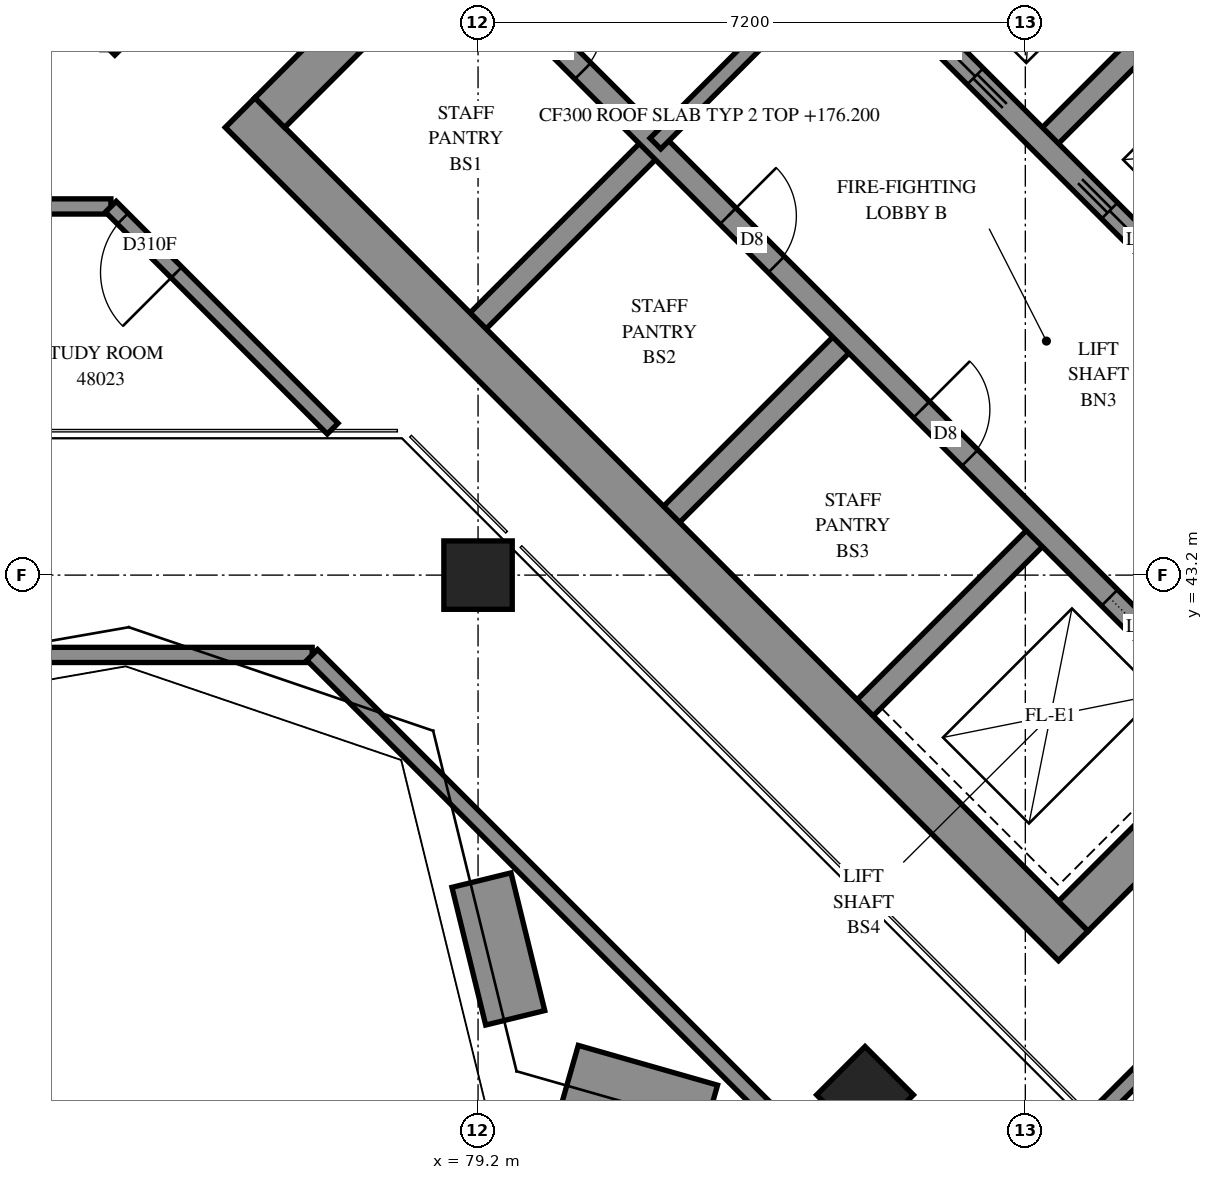
"""IFC4 building model, lengths in metres.
Left out: names, types, materials, properties, quantities, classifications, styles, units other than length and angle.
Written with IfcOpenShell. Run it as: python <this file> out.ifc"""

import sys

from ifc_helpers import new_model, si_unit, direction, frame, frame_2d, origin, origin_2d, place, context, subcontext, project, spatial, polyline, rectangle, outline, extrude, element, fill, save


model = new_model("IFC4")
c1 = context("Model", 3, precision=1e-05, world=origin(), true_north=direction((0.0, 1.0)))
c2 = subcontext(c1, "Body", "Model", "MODEL_VIEW")
j1 = project(units=[si_unit("LENGTHUNIT", "METRE"), si_unit("PLANEANGLEUNIT", "RADIAN")], contexts=[c1])
p1 = place(None, origin())
s1 = spatial("IfcSite", under=j1, at=p1, CompositionType="ELEMENT")
p2 = place(p1, origin())
s2 = spatial("IfcBuilding", under=s1, at=p2, CompositionType="ELEMENT")
p3 = place(p2, frame((0.0, 0.0, 176.2)))
s3 = spatial("IfcBuildingStorey", under=s2, at=p3, CompositionType="ELEMENT", Elevation=176.2)
for number, where, z_axis, x_axis in (
    (1, (79.2, 43.2, 0.0), (0.0, 0.0, 1.0), (1.0, 0.0, 0.0)),
    (2, (84.291, 36.362, 0.0), (0.0, 0.0, 1.0), (0.707, -0.707, 0.0)),
):
    element("IfcColumn", number, at=place(p3, frame(where, z_axis=z_axis, x_axis=x_axis)), inside=s3, PredefinedType="COLUMN", context=c2, shape_type="SweptSolid", body=[
        extrude(rectangle(XDim=0.9, YDim=0.9, at=origin_2d()), origin(), (0.0, 0.0, 1.0), 3.9),
    ])
p4 = place(p3, frame((76.071, 49.284, -0.3), z_axis=(0.0, 0.0, 1.0), x_axis=(0.7071035554, -0.707110007, 0.0)))
e3 = element("IfcWall", 3, at=p4, inside=s3, PredefinedType="SHEAR", context=c2, shape_type="SweptSolid", body=[
    extrude(rectangle(XDim=15.5, YDim=0.55, at=frame_2d((7.75, 0.0))), origin(), (0.0, 0.0, 1.0), 3.5),
])
p5 = place(p3, frame((86.642, 59.855, -0.3), z_axis=(0.0, 0.0, 1.0), x_axis=(0.707110007, -0.7071035554, 0.0)))
e4 = element("IfcWall", 4, at=p5, inside=s3, PredefinedType="SHEAR", context=c2, shape_type="SweptSolid", body=[
    extrude(rectangle(XDim=15.5, YDim=0.55, at=frame_2d((7.75, 0.0))), origin(), (0.0, 0.0, 1.0), 3.5),
])
p6 = place(p5, frame((10.55, 0.0, 0.3)))
e5 = element("IfcOpeningElement", 5, at=p6, cuts=e4, PredefinedType="OPENING", context=c2, shape_type="SweptSolid", body=[
    extrude(rectangle(XDim=0.8, YDim=2.1, at=frame_2d((0.4, 1.05))), frame((0.0, 0.285, 0.0), z_axis=(0.0, -1.0, 0.0), x_axis=(1.0, 0.0, 0.0)), (0.0, 0.0, 1.0), 0.57),
])
p7 = place(p3, frame((76.46, 49.284, -0.3), z_axis=(0.0, 0.0, 1.0), x_axis=(0.7071067812, 0.7071067812, 0.0)))
e6 = element("IfcWall", 6, at=p7, inside=s3, PredefinedType="SHEAR", context=c2, shape_type="SweptSolid", body=[
    extrude(rectangle(XDim=14.4, YDim=0.55, at=frame_2d((7.2, 0.0))), origin(), (0.0, 0.0, 1.0), 3.5),
])
p8 = place(p7, frame((4.55, 0.0, 0.3)))
e7 = element("IfcOpeningElement", 7, at=p8, cuts=e6, PredefinedType="OPENING", context=c2, shape_type="SweptSolid", body=[
    extrude(rectangle(XDim=1.1, YDim=2.1, at=frame_2d((0.55, 1.05))), frame((0.0, 0.285, 0.0), z_axis=(0.0, -1.0, 0.0), x_axis=(1.0, 0.0, 0.0)), (0.0, 0.0, 1.0), 0.57),
])
p9 = place(p7, frame((11.35, 0.0, 0.3)))
e8 = element("IfcOpeningElement", 8, at=p9, cuts=e6, PredefinedType="OPENING", context=c2, shape_type="SweptSolid", body=[
    extrude(rectangle(XDim=1.1, YDim=2.1, at=frame_2d((0.55, 1.05))), frame((0.0, 0.285, 0.0), z_axis=(0.0, -1.0, 0.0), x_axis=(1.0, 0.0, 0.0)), (0.0, 0.0, 1.0), 0.57),
])
p10 = place(p3, frame((87.031, 38.713, -0.3), z_axis=(0.0, 0.0, 1.0), x_axis=(0.707103309, 0.7071102534, 0.0)))
e9 = element("IfcWall", 9, at=p10, inside=s3, PredefinedType="SHEAR", context=c2, shape_type="SweptSolid", body=[
    extrude(rectangle(XDim=14.4, YDim=0.55, at=frame_2d((7.2, 0.0))), origin(), (0.0, 0.0, 1.0), 3.5),
])
p11 = place(p10, frame((4.55, 0.0, 0.3)))
e10 = element("IfcOpeningElement", 10, at=p11, cuts=e9, PredefinedType="OPENING", context=c2, shape_type="SweptSolid", body=[
    extrude(rectangle(XDim=1.1, YDim=2.1, at=frame_2d((0.55, 1.05))), frame((0.0, 0.285, 0.0), z_axis=(0.0, -1.0, 0.0), x_axis=(1.0, 0.0, 0.0)), (0.0, 0.0, 1.0), 0.57),
])
p12 = place(p10, frame((11.35, 0.0, 0.3)))
e11 = element("IfcOpeningElement", 11, at=p12, cuts=e9, PredefinedType="OPENING", context=c2, shape_type="SweptSolid", body=[
    extrude(rectangle(XDim=1.1, YDim=2.1, at=frame_2d((0.55, 1.05))), frame((0.0, 0.285, 0.0), z_axis=(0.0, -1.0, 0.0), x_axis=(1.0, 0.0, 0.0)), (0.0, 0.0, 1.0), 0.57),
])
p13 = place(p3, frame((79.2, 46.544, 0.0), z_axis=(0.0, 0.0, 1.0), x_axis=(0.7071219326, 0.7070916295, 0.0)))
e12 = element("IfcWall", 12, at=p13, inside=s3, PredefinedType="SOLIDWALL", context=c2, shape_type="SweptSolid", body=[
    extrude(rectangle(XDim=3.3, YDim=0.3, at=frame_2d((1.65, 0.0))), origin(), (0.0, 0.0, 1.0), 3.9),
])
p14 = place(p3, frame((81.746, 43.999, 0.0), z_axis=(0.0, 0.0, 1.0), x_axis=(0.7071067812, 0.7071067812, 0.0)))
e13 = element("IfcWall", 13, at=p14, inside=s3, PredefinedType="SOLIDWALL", context=c2, shape_type="SweptSolid", body=[
    extrude(rectangle(XDim=3.3, YDim=0.3, at=frame_2d((1.65, 0.0))), origin(), (0.0, 0.0, 1.0), 3.9),
])
p15 = place(p3, frame((86.625, 48.878, 0.0), z_axis=(0.0, 0.0, 1.0), x_axis=(0.7071067812, 0.7071067812, 0.0)))
e14 = element("IfcWall", 14, at=p15, inside=s3, PredefinedType="SOLIDWALL", context=c2, shape_type="SweptSolid", body=[
    extrude(rectangle(XDim=3.3, YDim=0.3, at=frame_2d((1.65, 0.0))), origin(), (0.0, 0.0, 1.0), 3.9),
])
p16 = place(p3, frame((84.291, 41.453, 0.0), z_axis=(0.0, 0.0, 1.0), x_axis=(0.7071067812, 0.7071067812, 0.0)))
e15 = element("IfcWall", 15, at=p16, inside=s3, PredefinedType="SOLIDWALL", context=c2, shape_type="SweptSolid", body=[
    extrude(rectangle(XDim=3.3, YDim=0.3, at=frame_2d((1.65, 0.0))), origin(), (0.0, 0.0, 1.0), 3.9),
])
p17 = place(p3, frame((78.988, 51.423, 0.0), z_axis=(0.0, 0.0, 1.0), x_axis=(0.7071067812, -0.7071067812, 0.0)))
e16 = element("IfcWall", 16, at=p17, inside=s3, PredefinedType="SOLIDWALL", context=c2, shape_type="SweptSolid", body=[
    extrude(rectangle(XDim=14.4, YDim=0.3, at=frame_2d((7.2, 0.0))), origin(), (0.0, 0.0, 1.0), 3.9),
])
p18 = place(p17, frame((1.35, 0.0, 0.0)))
e17 = element("IfcOpeningElement", 17, at=p18, cuts=e16, PredefinedType="OPENING", context=c2, shape_type="SweptSolid", body=[
    extrude(rectangle(XDim=0.9, YDim=2.1, at=frame_2d((0.45, 1.05))), frame((0.0, 0.16, 0.0), z_axis=(0.0, -1.0, 0.0), x_axis=(1.0, 0.0, 0.0)), (0.0, 0.0, 1.0), 0.32),
])
p19 = place(p17, frame((4.95, 0.0, 0.0)))
e18 = element("IfcOpeningElement", 18, at=p19, cuts=e16, PredefinedType="OPENING", context=c2, shape_type="SweptSolid", body=[
    extrude(rectangle(XDim=0.9, YDim=2.1, at=frame_2d((0.45, 1.05))), frame((0.0, 0.16, 0.0), z_axis=(0.0, -1.0, 0.0), x_axis=(1.0, 0.0, 0.0)), (0.0, 0.0, 1.0), 0.32),
])
p20 = place(p17, frame((8.55, 0.0, 0.0)))
e19 = element("IfcOpeningElement", 19, at=p20, cuts=e16, PredefinedType="OPENING", context=c2, shape_type="SweptSolid", body=[
    extrude(rectangle(XDim=0.9, YDim=2.1, at=frame_2d((0.45, 1.05))), frame((0.0, 0.16, 0.0), z_axis=(0.0, -1.0, 0.0), x_axis=(1.0, 0.0, 0.0)), (0.0, 0.0, 1.0), 0.32),
])
p21 = place(p17, frame((12.05, 0.0, 0.0)))
e20 = element("IfcOpeningElement", 20, at=p21, cuts=e16, PredefinedType="OPENING", context=c2, shape_type="SweptSolid", body=[
    extrude(rectangle(XDim=1.1, YDim=2.1, at=frame_2d((0.55, 1.05))), frame((0.0, 0.16, 0.0), z_axis=(0.0, -1.0, 0.0), x_axis=(1.0, 0.0, 0.0)), (0.0, 0.0, 1.0), 0.32),
])
p22 = place(p3, frame((81.534, 53.969, 0.0), z_axis=(0.0, 0.0, 1.0), x_axis=(0.707103309, -0.7071102534, 0.0)))
e21 = element("IfcWall", 21, at=p22, inside=s3, PredefinedType="SOLIDWALL", context=c2, shape_type="SweptSolid", body=[
    extrude(rectangle(XDim=14.4, YDim=0.3, at=frame_2d((7.2, 0.0))), origin(), (0.0, 0.0, 1.0), 3.9),
])
p23 = place(p22, frame((1.25, 0.0, 0.0)))
e22 = element("IfcOpeningElement", 22, at=p23, cuts=e21, PredefinedType="OPENING", context=c2, shape_type="SweptSolid", body=[
    extrude(rectangle(XDim=1.1, YDim=2.1, at=frame_2d((0.55, 1.05))), frame((0.0, 0.16, 0.0), z_axis=(0.0, -1.0, 0.0), x_axis=(1.0, 0.0, 0.0)), (0.0, 0.0, 1.0), 0.32),
])
p24 = place(p22, frame((4.85, 0.0, 0.0)))
e23 = element("IfcOpeningElement", 23, at=p24, cuts=e21, PredefinedType="OPENING", context=c2, shape_type="SweptSolid", body=[
    extrude(rectangle(XDim=1.1, YDim=2.1, at=frame_2d((0.55, 1.05))), frame((0.0, 0.16, 0.0), z_axis=(0.0, -1.0, 0.0), x_axis=(1.0, 0.0, 0.0)), (0.0, 0.0, 1.0), 0.32),
])
p25 = place(p22, frame((8.45, 0.0, 0.0)))
e24 = element("IfcOpeningElement", 24, at=p25, cuts=e21, PredefinedType="OPENING", context=c2, shape_type="SweptSolid", body=[
    extrude(rectangle(XDim=1.1, YDim=2.1, at=frame_2d((0.55, 1.05))), frame((0.0, 0.16, 0.0), z_axis=(0.0, -1.0, 0.0), x_axis=(1.0, 0.0, 0.0)), (0.0, 0.0, 1.0), 0.32),
])
p26 = place(p22, frame((12.05, 0.0, 0.0)))
e25 = element("IfcOpeningElement", 25, at=p26, cuts=e21, PredefinedType="OPENING", context=c2, shape_type="SweptSolid", body=[
    extrude(rectangle(XDim=1.1, YDim=2.1, at=frame_2d((0.55, 1.05))), frame((0.0, 0.16, 0.0), z_axis=(0.0, -1.0, 0.0), x_axis=(1.0, 0.0, 0.0)), (0.0, 0.0, 1.0), 0.32),
])
p27 = place(p3, frame((79.245, 39.188, 0.0), z_axis=(0.0, 0.0, 1.0), x_axis=(0.2379162082, -0.9712856829, 0.0)))
e26 = element("IfcWall", 26, at=p27, inside=s3, PredefinedType="SOLIDWALL", context=c2, shape_type="SweptSolid", body=[
    extrude(rectangle(XDim=1.865, YDim=0.8, at=frame_2d((0.933, 0.0))), origin(), (0.0, 0.0, 1.0), 0.65),
])
p28 = place(p3, frame((80.409, 36.628, 0.0), z_axis=(0.0, 0.0, 1.0), x_axis=(0.9616031151, -0.2744438904, 0.0)))
e27 = element("IfcWall", 27, at=p28, inside=s3, PredefinedType="SOLIDWALL", context=c2, shape_type="SweptSolid", body=[
    extrude(rectangle(XDim=1.906, YDim=0.8, at=frame_2d((0.953, 0.0))), origin(), (0.0, 0.0, 1.0), 0.65),
])
p29 = place(p3, frame((102.747, 49.938, 0.0), z_axis=(0.0, 0.0, 1.0), x_axis=(-0.7071083109, 0.7071052514, 0.0)))
e28 = element("IfcWall", 28, at=p29, inside=s3, PredefinedType="SOLIDWALL", context=c2, shape_type="SweptSolid", body=[
    extrude(outline(polyline([(-0.1, -0.1), (32.726, -0.1), (32.644, 0.1), (0.1, 0.1), (-0.1, -0.1)])), origin(), (0.0, 0.0, 1.0), 4.2),
])
p30 = place(p3, frame((49.35, 42.15, 0.0), z_axis=(0.0, 0.0, 1.0), x_axis=(1.0, 0.0, 0.0)))
e29 = element("IfcWall", 29, at=p30, inside=s3, PredefinedType="SOLIDWALL", context=c2, shape_type="SweptSolid", body=[
    extrude(outline(polyline([(-0.1, -0.1), (27.627, -0.1), (27.709, 0.1), (0.1, 0.1), (-0.1, -0.1)])), origin(), (0.0, 0.0, 1.0), 4.2),
])
p31 = place(p3, frame((77.018, 42.15, 0.0), z_axis=(0.0, 0.0, 1.0), x_axis=(0.7071039217, -0.7071096407, 0.0)))
e30 = element("IfcWall", 30, at=p31, inside=s3, PredefinedType="SOLIDWALL", context=c2, shape_type="SweptSolid", body=[
    extrude(outline(polyline([(0.041, -0.1), (17.586, -0.1), (17.386, 0.1), (-0.041, 0.1), (0.041, -0.1)])), origin(), (0.0, 0.0, 1.0), 4.2),
])
p32 = place(p3, frame((81.534, 48.878, 0.0), z_axis=(0.0, 0.0, 1.0), x_axis=(0.707092892, 0.7071206701, 0.0)))
e31 = element("IfcWall", 31, at=p32, inside=s3, PredefinedType="PARTITIONING", context=c2, shape_type="SweptSolid", body=[
    extrude(rectangle(XDim=3.6, YDim=0.2, at=frame_2d((1.8, 0.0))), origin(), (0.0, 0.0, 1.0), 3.9),
])
p33 = place(p3, frame((55.25, 48.05, 0.0), z_axis=(0.0, 0.0, 1.0), x_axis=(1.0, 0.0, 0.0)))
e32 = element("IfcWall", 32, at=p33, inside=s3, PredefinedType="PARTITIONING", context=c2, shape_type="SweptSolid", body=[
    extrude(rectangle(XDim=19.12, YDim=0.2, at=frame_2d((9.56, 0.0))), origin(), (0.0, 0.0, 1.0), 3.9),
])
p34 = place(p33, frame((4.383, 0.0, 0.0)))
e33 = element("IfcOpeningElement", 33, at=p34, cuts=e32, PredefinedType="OPENING", context=c2, shape_type="SweptSolid", body=[
    extrude(rectangle(XDim=1.0, YDim=2.1, at=frame_2d((0.5, 1.05))), frame((0.0, 0.11, 0.0), z_axis=(0.0, -1.0, 0.0), x_axis=(1.0, 0.0, 0.0)), (0.0, 0.0, 1.0), 0.22),
])
p35 = place(p33, frame((6.457, 0.0, 0.0)))
e34 = element("IfcOpeningElement", 34, at=p35, cuts=e32, PredefinedType="OPENING", context=c2, shape_type="SweptSolid", body=[
    extrude(rectangle(XDim=1.0, YDim=2.1, at=frame_2d((0.5, 1.05))), frame((0.0, 0.11, 0.0), z_axis=(0.0, -1.0, 0.0), x_axis=(1.0, 0.0, 0.0)), (0.0, 0.0, 1.0), 0.22),
])
p36 = place(p33, frame((11.582, 0.0, 0.0)))
e35 = element("IfcOpeningElement", 35, at=p36, cuts=e32, PredefinedType="OPENING", context=c2, shape_type="SweptSolid", body=[
    extrude(rectangle(XDim=1.0, YDim=2.1, at=frame_2d((0.5, 1.05))), frame((0.0, 0.11, 0.0), z_axis=(0.0, -1.0, 0.0), x_axis=(1.0, 0.0, 0.0)), (0.0, 0.0, 1.0), 0.22),
])
p37 = place(p33, frame((13.658, 0.0, 0.0)))
e36 = element("IfcOpeningElement", 36, at=p37, cuts=e32, PredefinedType="OPENING", context=c2, shape_type="SweptSolid", body=[
    extrude(rectangle(XDim=1.0, YDim=2.1, at=frame_2d((0.5, 1.05))), frame((0.0, 0.11, 0.0), z_axis=(0.0, -1.0, 0.0), x_axis=(1.0, 0.0, 0.0)), (0.0, 0.0, 1.0), 0.22),
])
p38 = place(p3, frame((87.317, 36.066, 0.0), z_axis=(0.0, 0.0, 1.0), x_axis=(0.7071067812, 0.7071067812, 0.0)))
e37 = element("IfcWall", 37, at=p38, inside=s3, PredefinedType="PARTITIONING", context=c2, shape_type="SweptSolid", body=[
    extrude(rectangle(XDim=7.971, YDim=0.2, at=frame_2d((3.985, 0.0))), origin(), (0.0, 0.0, 1.0), 3.9),
])
p39 = place(p38, frame((6.818, 0.0, 0.0)))
e38 = element("IfcOpeningElement", 38, at=p39, cuts=e37, PredefinedType="OPENING", context=c2, shape_type="SweptSolid", body=[
    extrude(rectangle(XDim=1.0, YDim=2.1, at=frame_2d((0.5, 1.05))), frame((0.0, 0.11, 0.0), z_axis=(0.0, -1.0, 0.0), x_axis=(1.0, 0.0, 0.0)), (0.0, 0.0, 1.0), 0.22),
])
p40 = place(p3, frame((74.351, 50.111, 0.0), z_axis=(0.0, 0.0, 1.0), x_axis=(0.7071067812, 0.7071067812, 0.0)))
e39 = element("IfcWall", 39, at=p40, inside=s3, PredefinedType="PARTITIONING", context=c2, shape_type="SweptSolid", body=[
    extrude(rectangle(XDim=4.226, YDim=0.2, at=frame_2d((2.113, 0.0))), origin(), (0.0, 0.0, 1.0), 3.9),
])
p41 = place(p3, frame((77.287, 45.127, 0.0), z_axis=(0.0, 0.0, 1.0), x_axis=(-0.7069614206, 0.7072521119, 0.0)))
e40 = element("IfcWall", 40, at=p41, inside=s3, PredefinedType="PARTITIONING", context=c2, shape_type="SweptSolid", body=[
    extrude(rectangle(XDim=4.128, YDim=0.2, at=frame_2d((2.064, 0.0))), origin(), (0.0, 0.0, 1.0), 3.9),
])
p42 = place(p41, frame((2.906, 0.0, 0.0)))
e41 = element("IfcOpeningElement", 41, at=p42, cuts=e40, PredefinedType="OPENING", context=c2, shape_type="SweptSolid", body=[
    extrude(rectangle(XDim=1.0, YDim=2.1, at=frame_2d((0.5, 1.05))), frame((0.0, 0.11, 0.0), z_axis=(0.0, -1.0, 0.0), x_axis=(1.0, 0.0, 0.0)), (0.0, 0.0, 1.0), 0.22),
])
p43 = place(p18, origin())
e42 = element("IfcDoor", 42, at=p43, inside=s3, OperationType="SINGLE_SWING_LEFT", PredefinedType="DOOR", context=c2, shape_type="SweptSolid", body=[
    extrude(rectangle(XDim=0.9, YDim=2.1, at=frame_2d((0.45, 1.05))), frame((0.0, 0.025, 0.0), z_axis=(0.0, -1.0, 0.0), x_axis=(1.0, 0.0, 0.0)), (0.0, 0.0, 1.0), 0.05),
])
fill(e17, e42)
p44 = place(p19, origin())
e43 = element("IfcDoor", 43, at=p44, inside=s3, OperationType="SINGLE_SWING_LEFT", PredefinedType="DOOR", context=c2, shape_type="SweptSolid", body=[
    extrude(rectangle(XDim=0.9, YDim=2.1, at=frame_2d((0.45, 1.05))), frame((0.0, 0.025, 0.0), z_axis=(0.0, -1.0, 0.0), x_axis=(1.0, 0.0, 0.0)), (0.0, 0.0, 1.0), 0.05),
])
fill(e18, e43)
p45 = place(p20, origin())
e44 = element("IfcDoor", 44, at=p45, inside=s3, OperationType="SINGLE_SWING_LEFT", PredefinedType="DOOR", context=c2, shape_type="SweptSolid", body=[
    extrude(rectangle(XDim=0.9, YDim=2.1, at=frame_2d((0.45, 1.05))), frame((0.0, 0.025, 0.0), z_axis=(0.0, -1.0, 0.0), x_axis=(1.0, 0.0, 0.0)), (0.0, 0.0, 1.0), 0.05),
])
fill(e19, e44)
p46 = place(p21, origin())
e45 = element("IfcDoor", 45, at=p46, inside=s3, OperationType="SLIDING_TO_RIGHT", PredefinedType="DOOR", context=c2, shape_type="SweptSolid", body=[
    extrude(rectangle(XDim=1.1, YDim=2.1, at=frame_2d((0.55, 1.05))), frame((0.0, 0.025, 0.0), z_axis=(0.0, -1.0, 0.0), x_axis=(1.0, 0.0, 0.0)), (0.0, 0.0, 1.0), 0.05),
])
fill(e20, e45)
p47 = place(p24, origin())
e46 = element("IfcDoor", 46, at=p47, inside=s3, OperationType="SLIDING_TO_RIGHT", PredefinedType="DOOR", context=c2, shape_type="SweptSolid", body=[
    extrude(rectangle(XDim=1.1, YDim=2.1, at=frame_2d((0.55, 1.05))), frame((0.0, 0.025, 0.0), z_axis=(0.0, -1.0, 0.0), x_axis=(1.0, 0.0, 0.0)), (0.0, 0.0, 1.0), 0.05),
])
fill(e23, e46)
p48 = place(p25, origin())
e47 = element("IfcDoor", 47, at=p48, inside=s3, OperationType="SLIDING_TO_LEFT", PredefinedType="DOOR", context=c2, shape_type="SweptSolid", body=[
    extrude(rectangle(XDim=1.1, YDim=2.1, at=frame_2d((0.55, 1.05))), frame((0.0, 0.025, 0.0), z_axis=(0.0, -1.0, 0.0), x_axis=(1.0, 0.0, 0.0)), (0.0, 0.0, 1.0), 0.05),
])
fill(e24, e47)
p49 = place(p42, origin())
e48 = element("IfcDoor", 48, at=p49, inside=s3, OperationType="SINGLE_SWING_LEFT", PredefinedType="DOOR", context=c2, shape_type="SweptSolid", body=[
    extrude(rectangle(XDim=1.0, YDim=2.1, at=frame_2d((0.5, 1.05))), frame((0.0, 0.025, 0.0), z_axis=(0.0, -1.0, 0.0), x_axis=(1.0, 0.0, 0.0)), (0.0, 0.0, 1.0), 0.05),
])
fill(e41, e48)
save(model, sys.argv[1])
